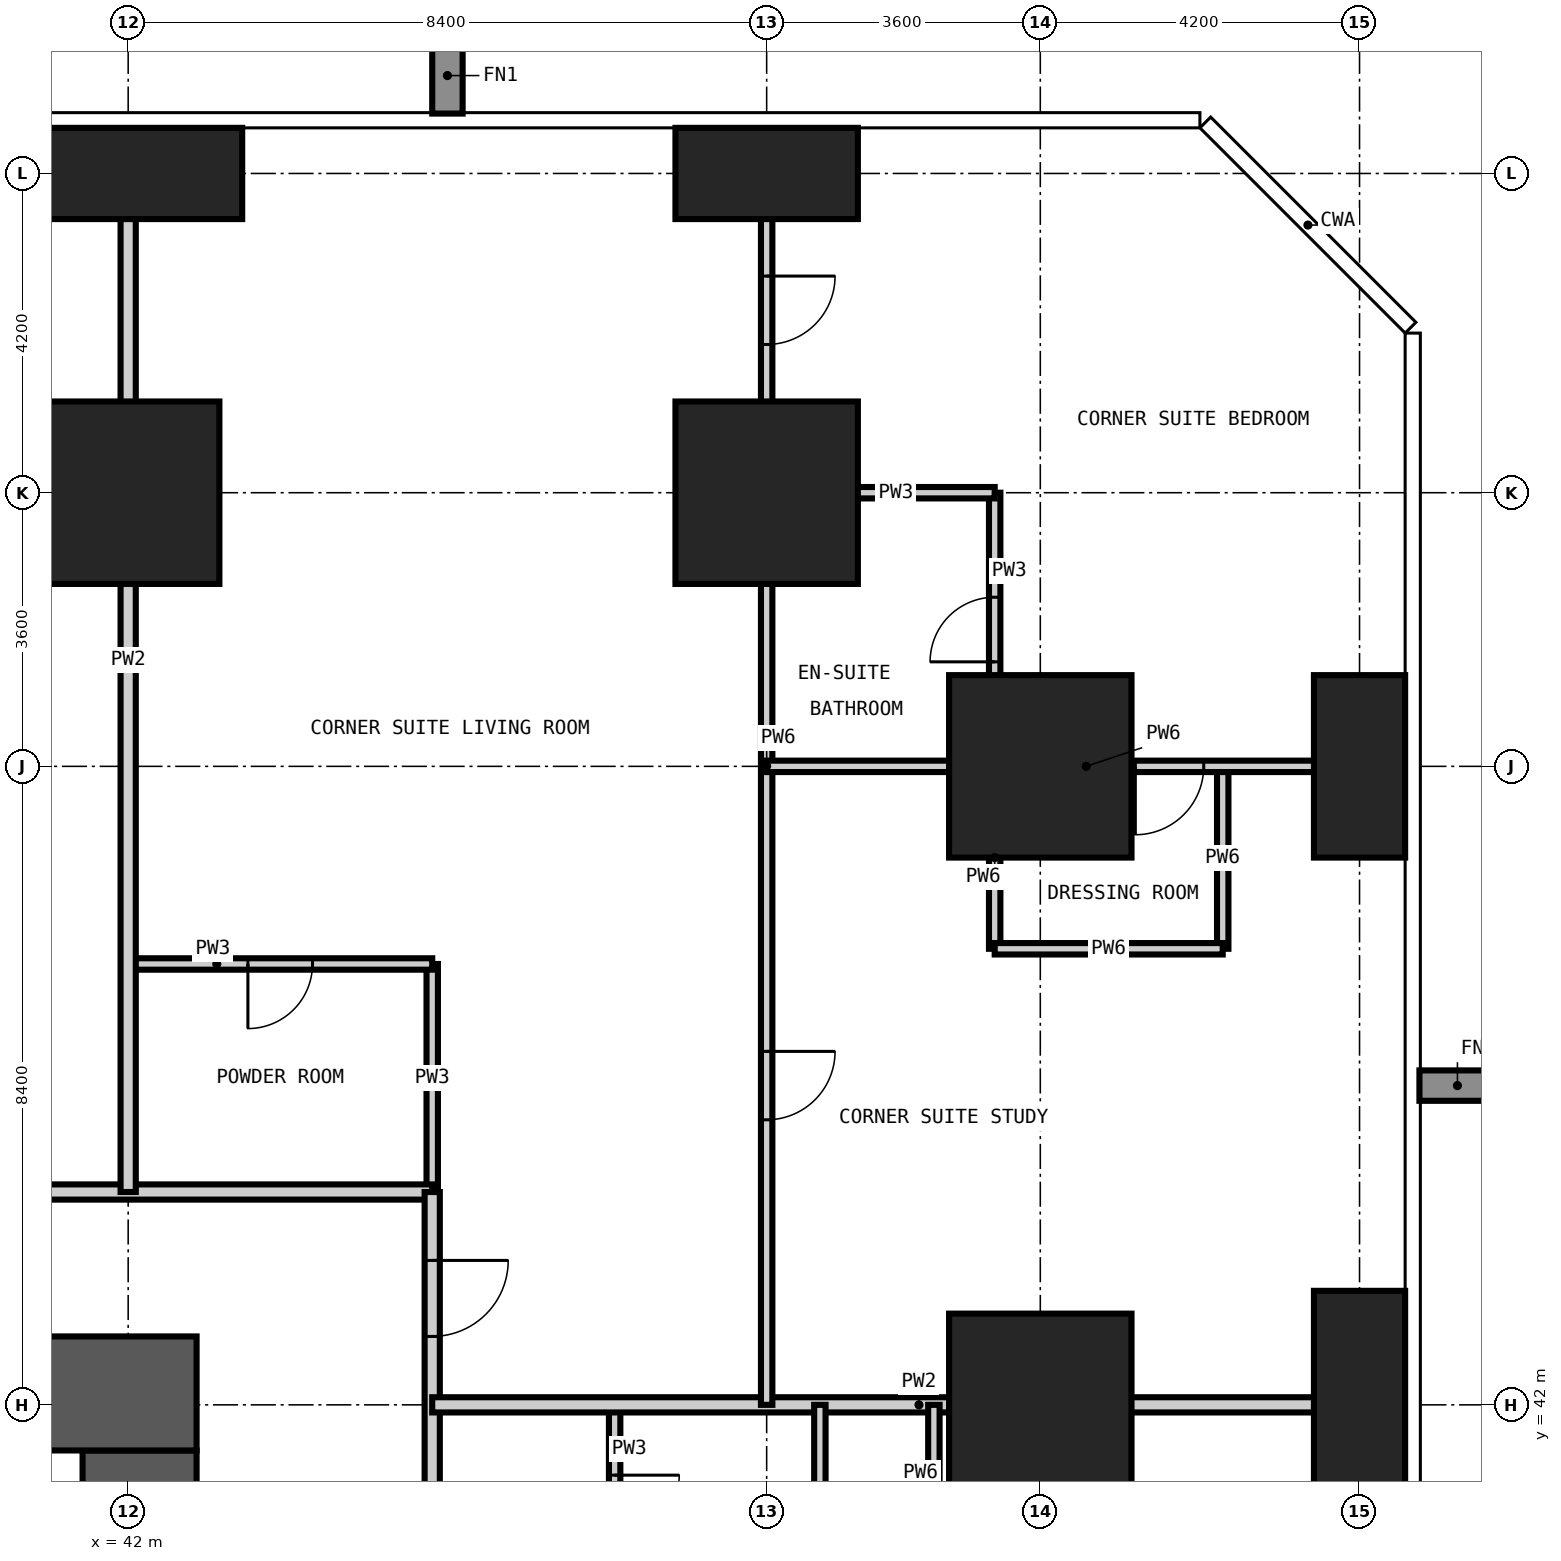
"""IFC4 building model, lengths in metres.
Left out: names, types, materials, properties, quantities, classifications, styles, units other than length and angle.
Written with IfcOpenShell. Run it as: python <this file> out.ifc"""

import sys

from ifc_helpers import new_model, si_unit, direction, frame, frame_2d, origin, origin_2d, place, context, subcontext, project, spatial, rectangle, extrude, element, fill, save


model = new_model("IFC4")
c1 = context("Model", 3, precision=1e-05, world=origin(), true_north=direction((0.0, 1.0)))
c2 = subcontext(c1, "Body", "Model", "MODEL_VIEW")
j1 = project(units=[si_unit("LENGTHUNIT", "METRE"), si_unit("PLANEANGLEUNIT", "RADIAN")], contexts=[c1])
p1 = place(None, origin())
s1 = spatial("IfcSite", under=j1, at=p1, CompositionType="ELEMENT")
p2 = place(p1, origin())
s2 = spatial("IfcBuilding", under=s1, at=p2, CompositionType="ELEMENT")
p3 = place(p2, frame((0.0, 0.0, 84.6)))
s3 = spatial("IfcBuildingStorey", under=s2, at=p3, CompositionType="ELEMENT", Elevation=84.6)
p4 = place(p3, frame((42.0, 54.0, -0.35), z_axis=(0.0, 0.0, 1.0), x_axis=(1.0, 0.0, 0.0)))
e1 = element("IfcColumn", 1, at=p4, inside=s3, PredefinedType="COLUMN", context=c2, shape_type="SweptSolid", body=[
    extrude(rectangle(XDim=2.4, YDim=2.4, at=origin_2d()), origin(), (0.0, 0.0, 1.0), 3.55),
])
p5 = place(p3, frame((42.0, 58.2, -0.35), z_axis=(0.0, 0.0, 1.0), x_axis=(1.0, 0.0, 0.0)))
e2 = element("IfcColumn", 2, at=p5, inside=s3, PredefinedType="COLUMN", context=c2, shape_type="SweptSolid", body=[
    extrude(rectangle(XDim=3.0, YDim=1.2, at=origin_2d()), origin(), (0.0, 0.0, 1.0), 3.55),
])
p6 = place(p3, frame((50.4, 54.0, -0.35), z_axis=(0.0, 0.0, 1.0), x_axis=(1.0, 0.0, 0.0)))
e3 = element("IfcColumn", 3, at=p6, inside=s3, PredefinedType="COLUMN", context=c2, shape_type="SweptSolid", body=[
    extrude(rectangle(XDim=2.4, YDim=2.4, at=origin_2d()), origin(), (0.0, 0.0, 1.0), 3.55),
])
p7 = place(p3, frame((50.4, 58.2, -0.35), z_axis=(0.0, 0.0, 1.0), x_axis=(1.0, 0.0, 0.0)))
e4 = element("IfcColumn", 4, at=p7, inside=s3, PredefinedType="COLUMN", context=c2, shape_type="SweptSolid", body=[
    extrude(rectangle(XDim=2.4, YDim=1.2, at=origin_2d()), origin(), (0.0, 0.0, 1.0), 3.55),
])
for number, where, z_axis, x_axis in (
    (5, (54.0, 42.0, -0.35), (0.0, 0.0, 1.0), (1.0, 0.0, 0.0)),
    (6, (54.0, 50.4, -0.35), (0.0, 0.0, 1.0), (1.0, 0.0, 0.0)),
):
    element("IfcColumn", number, at=place(p3, frame(where, z_axis=z_axis, x_axis=x_axis)), inside=s3, PredefinedType="COLUMN", context=c2, shape_type="SweptSolid", body=[
        extrude(rectangle(XDim=2.4, YDim=2.4, at=origin_2d()), origin(), (0.0, 0.0, 1.0), 3.55),
    ])
p8 = place(p3, frame((58.2, 42.0, -0.35), z_axis=(0.0, 0.0, 1.0), x_axis=(1.0, 0.0, 0.0)))
e7 = element("IfcColumn", 7, at=p8, inside=s3, PredefinedType="COLUMN", context=c2, shape_type="SweptSolid", body=[
    extrude(rectangle(XDim=1.2, YDim=3.0, at=origin_2d()), origin(), (0.0, 0.0, 1.0), 3.55),
])
p9 = place(p3, frame((58.2, 50.4, -0.35), z_axis=(0.0, 0.0, 1.0), x_axis=(1.0, 0.0, 0.0)))
e8 = element("IfcColumn", 8, at=p9, inside=s3, PredefinedType="COLUMN", context=c2, shape_type="SweptSolid", body=[
    extrude(rectangle(XDim=1.2, YDim=2.4, at=origin_2d()), origin(), (0.0, 0.0, 1.0), 3.55),
])
p10 = place(p3, frame((42.15, 17.4, -0.35), z_axis=(0.0, 0.0, 1.0), x_axis=(0.0, 1.0, 0.0)))
e9 = element("IfcWall", 9, at=p10, inside=s3, PredefinedType="SHEAR", context=c2, shape_type="SweptSolid", body=[
    extrude(rectangle(XDim=24.0, YDim=1.5, at=frame_2d((12.0, 0.0))), origin(), (0.0, 0.0, 1.0), 3.55),
])
p11 = place(p10, frame((0.2, 0.0, 0.35)))
e10 = element("IfcOpeningElement", 10, at=p11, cuts=e9, PredefinedType="OPENING", context=c2, shape_type="SweptSolid", body=[
    extrude(rectangle(XDim=1.2, YDim=2.2, at=frame_2d((0.6, 1.1))), frame((0.0, 0.76, 0.0), z_axis=(0.0, -1.0, 0.0), x_axis=(1.0, 0.0, 0.0)), (0.0, 0.0, 1.0), 1.52),
])
p12 = place(p10, frame((11.5, 0.0, 0.35)))
e11 = element("IfcOpeningElement", 11, at=p12, cuts=e9, PredefinedType="OPENING", context=c2, shape_type="SweptSolid", body=[
    extrude(rectangle(XDim=1.0, YDim=2.1, at=frame_2d((0.5, 1.05))), frame((0.0, 0.76, 0.0), z_axis=(0.0, -1.0, 0.0), x_axis=(1.0, 0.0, 0.0)), (0.0, 0.0, 1.0), 1.52),
])
p13 = place(p10, frame((19.9, 0.0, 0.35)))
e12 = element("IfcOpeningElement", 12, at=p13, cuts=e9, PredefinedType="OPENING", context=c2, shape_type="SweptSolid", body=[
    extrude(rectangle(XDim=1.0, YDim=2.1, at=frame_2d((0.5, 1.05))), frame((0.0, 0.76, 0.0), z_axis=(0.0, -1.0, 0.0), x_axis=(1.0, 0.0, 0.0)), (0.0, 0.0, 1.0), 1.52),
])
p14 = place(p3, frame((42.9, 42.15, -0.35), z_axis=(0.0, 0.0, 1.0), x_axis=(-1.0, 0.0, 0.0)))
e13 = element("IfcWall", 13, at=p14, inside=s3, PredefinedType="SHEAR", context=c2, shape_type="SweptSolid", body=[
    extrude(rectangle(XDim=27.0, YDim=1.5, at=frame_2d((13.5, 0.0))), origin(), (0.0, 0.0, 1.0), 3.55),
])
p15 = place(p14, frame((21.4, 0.0, 0.35)))
e14 = element("IfcOpeningElement", 14, at=p15, cuts=e13, PredefinedType="OPENING", context=c2, shape_type="SweptSolid", body=[
    extrude(rectangle(XDim=1.0, YDim=2.1, at=frame_2d((0.5, 1.05))), frame((0.0, 0.76, 0.0), z_axis=(0.0, -1.0, 0.0), x_axis=(1.0, 0.0, 0.0)), (0.0, 0.0, 1.0), 1.52),
])
p16 = place(p14, frame((10.8, 0.0, 0.35)))
e15 = element("IfcOpeningElement", 15, at=p16, cuts=e13, PredefinedType="OPENING", context=c2, shape_type="SweptSolid", body=[
    extrude(rectangle(XDim=1.2, YDim=2.2, at=frame_2d((0.6, 1.1))), frame((0.0, 0.76, 0.0), z_axis=(0.0, -1.0, 0.0), x_axis=(1.0, 0.0, 0.0)), (0.0, 0.0, 1.0), 1.52),
])
p17 = place(p3, frame((46.0, 44.8, 0.0), z_axis=(0.0, 0.0, 1.0), x_axis=(0.0, 1.0, 0.0)))
e16 = element("IfcWall", 16, at=p17, inside=s3, PredefinedType="PARTITIONING", context=c2, shape_type="SweptSolid", body=[
    extrude(rectangle(XDim=3.0, YDim=0.15, at=frame_2d((1.5, 0.0))), origin(), (0.0, 0.0, 1.0), 3.2),
])
p18 = place(p3, frame((48.4, 39.3, 0.0), z_axis=(0.0, 0.0, 1.0), x_axis=(0.0, 1.0, 0.0)))
e17 = element("IfcWall", 17, at=p18, inside=s3, PredefinedType="PARTITIONING", context=c2, shape_type="SweptSolid", body=[
    extrude(rectangle(XDim=2.7, YDim=0.15, at=frame_2d((1.35, 0.0))), origin(), (0.0, 0.0, 1.0), 3.2),
])
p19 = place(p18, frame((0.925, 0.0, 0.0)))
e18 = element("IfcOpeningElement", 18, at=p19, cuts=e17, PredefinedType="OPENING", context=c2, shape_type="SweptSolid", body=[
    extrude(rectangle(XDim=0.85, YDim=2.1, at=frame_2d((0.425, 1.05))), frame((0.0, 0.085, 0.0), z_axis=(0.0, -1.0, 0.0), x_axis=(1.0, 0.0, 0.0)), (0.0, 0.0, 1.0), 0.17),
])
p20 = place(p3, frame((53.4, 50.4, 0.0), z_axis=(0.0, 0.0, 1.0), x_axis=(0.0, 1.0, 0.0)))
e19 = element("IfcWall", 19, at=p20, inside=s3, PredefinedType="PARTITIONING", context=c2, shape_type="SweptSolid", body=[
    extrude(rectangle(XDim=3.6, YDim=0.15, at=frame_2d((1.8, 0.0))), origin(), (0.0, 0.0, 1.0), 3.2),
])
p21 = place(p20, frame((1.375, 0.0, 0.0)))
e20 = element("IfcOpeningElement", 20, at=p21, cuts=e19, PredefinedType="OPENING", context=c2, shape_type="SweptSolid", body=[
    extrude(rectangle(XDim=0.85, YDim=2.1, at=frame_2d((0.425, 1.05))), frame((0.0, 0.085, 0.0), z_axis=(0.0, -1.0, 0.0), x_axis=(1.0, 0.0, 0.0)), (0.0, 0.0, 1.0), 0.17),
])
p22 = place(p3, frame((42.0, 47.8, 0.0), z_axis=(0.0, 0.0, 1.0), x_axis=(1.0, 0.0, 0.0)))
e21 = element("IfcWall", 21, at=p22, inside=s3, PredefinedType="PARTITIONING", context=c2, shape_type="SweptSolid", body=[
    extrude(rectangle(XDim=4.0, YDim=0.15, at=frame_2d((2.0, 0.0))), origin(), (0.0, 0.0, 1.0), 3.2),
])
p23 = place(p22, frame((1.575, 0.0, 0.0)))
e22 = element("IfcOpeningElement", 22, at=p23, cuts=e21, PredefinedType="OPENING", context=c2, shape_type="SweptSolid", body=[
    extrude(rectangle(XDim=0.85, YDim=2.1, at=frame_2d((0.425, 1.05))), frame((0.0, 0.085, 0.0), z_axis=(0.0, -1.0, 0.0), x_axis=(1.0, 0.0, 0.0)), (0.0, 0.0, 1.0), 0.17),
])
p24 = place(p3, frame((50.4, 54.0, 0.0), z_axis=(0.0, 0.0, 1.0), x_axis=(1.0, 0.0, 0.0)))
e23 = element("IfcWall", 23, at=p24, inside=s3, PredefinedType="PARTITIONING", context=c2, shape_type="SweptSolid", body=[
    extrude(rectangle(XDim=3.0, YDim=0.15, at=frame_2d((1.5, 0.0))), origin(), (0.0, 0.0, 1.0), 3.2),
])
p25 = place(p3, frame((13.4, 44.8, 0.0), z_axis=(0.0, 0.0, 1.0), x_axis=(1.0, 0.0, 0.0)))
e24 = element("IfcWall", 24, at=p25, inside=s3, PredefinedType="PARTITIONING", context=c2, shape_type="SweptSolid", body=[
    extrude(rectangle(XDim=32.6, YDim=0.2, at=frame_2d((16.3, 0.0))), origin(), (0.0, 0.0, 1.0), 3.2),
])
p26 = place(p25, frame((7.1, 0.0, 0.0)))
e25 = element("IfcOpeningElement", 25, at=p26, cuts=e24, PredefinedType="OPENING", context=c2, shape_type="SweptSolid", body=[
    extrude(rectangle(XDim=1.0, YDim=2.2, at=frame_2d((0.5, 1.1))), frame((0.0, 0.11, 0.0), z_axis=(0.0, -1.0, 0.0), x_axis=(1.0, 0.0, 0.0)), (0.0, 0.0, 1.0), 0.22),
])
p27 = place(p25, frame((15.5, 0.0, 0.0)))
e26 = element("IfcOpeningElement", 26, at=p27, cuts=e24, PredefinedType="OPENING", context=c2, shape_type="SweptSolid", body=[
    extrude(rectangle(XDim=1.0, YDim=2.2, at=frame_2d((0.5, 1.1))), frame((0.0, 0.11, 0.0), z_axis=(0.0, -1.0, 0.0), x_axis=(1.0, 0.0, 0.0)), (0.0, 0.0, 1.0), 0.22),
])
p28 = place(p25, frame((23.9, 0.0, 0.0)))
e27 = element("IfcOpeningElement", 27, at=p28, cuts=e24, PredefinedType="OPENING", context=c2, shape_type="SweptSolid", body=[
    extrude(rectangle(XDim=1.0, YDim=2.2, at=frame_2d((0.5, 1.1))), frame((0.0, 0.11, 0.0), z_axis=(0.0, -1.0, 0.0), x_axis=(1.0, 0.0, 0.0)), (0.0, 0.0, 1.0), 0.22),
])
p29 = place(p3, frame((46.0, 44.8, 0.0), z_axis=(0.0, 0.0, 1.0), x_axis=(0.0, -1.0, 0.0)))
e28 = element("IfcWall", 28, at=p29, inside=s3, PredefinedType="PARTITIONING", context=c2, shape_type="SweptSolid", body=[
    extrude(rectangle(XDim=31.4, YDim=0.2, at=frame_2d((15.7, 0.0))), origin(), (0.0, 0.0, 1.0), 3.2),
])
p30 = place(p29, frame((21.2, 0.0, 0.0)))
e29 = element("IfcOpeningElement", 29, at=p30, cuts=e28, PredefinedType="OPENING", context=c2, shape_type="SweptSolid", body=[
    extrude(rectangle(XDim=1.0, YDim=2.2, at=frame_2d((0.5, 1.1))), frame((0.0, 0.11, 0.0), z_axis=(0.0, -1.0, 0.0), x_axis=(1.0, 0.0, 0.0)), (0.0, 0.0, 1.0), 0.22),
])
p31 = place(p29, frame((8.6, 0.0, 0.0)))
e30 = element("IfcOpeningElement", 30, at=p31, cuts=e28, PredefinedType="OPENING", context=c2, shape_type="SweptSolid", body=[
    extrude(rectangle(XDim=1.0, YDim=2.2, at=frame_2d((0.5, 1.1))), frame((0.0, 0.11, 0.0), z_axis=(0.0, -1.0, 0.0), x_axis=(1.0, 0.0, 0.0)), (0.0, 0.0, 1.0), 0.22),
])
p32 = place(p29, frame((29.2, 0.0, 0.0)))
e31 = element("IfcOpeningElement", 31, at=p32, cuts=e28, PredefinedType="OPENING", context=c2, shape_type="SweptSolid", body=[
    extrude(rectangle(XDim=1.0, YDim=2.2, at=frame_2d((0.5, 1.1))), frame((0.0, 0.11, 0.0), z_axis=(0.0, -1.0, 0.0), x_axis=(1.0, 0.0, 0.0)), (0.0, 0.0, 1.0), 0.22),
])
p33 = place(p29, frame((0.9, 0.0, 0.0)))
e32 = element("IfcOpeningElement", 32, at=p33, cuts=e28, PredefinedType="OPENING", context=c2, shape_type="SweptSolid", body=[
    extrude(rectangle(XDim=1.0, YDim=2.2, at=frame_2d((0.5, 1.1))), frame((0.0, 0.11, 0.0), z_axis=(0.0, -1.0, 0.0), x_axis=(1.0, 0.0, 0.0)), (0.0, 0.0, 1.0), 0.22),
])
p34 = place(p3, frame((42.0, 44.8, 0.0), z_axis=(0.0, 0.0, 1.0), x_axis=(0.0, 1.0, 0.0)))
e33 = element("IfcWall", 33, at=p34, inside=s3, PredefinedType="PARTITIONING", context=c2, shape_type="SweptSolid", body=[
    extrude(rectangle(XDim=14.008, YDim=0.2, at=frame_2d((7.004, 0.0))), origin(), (0.0, 0.0, 1.0), 3.2),
])
p35 = place(p3, frame((46.0, 42.0, 0.0), z_axis=(0.0, 0.0, 1.0), x_axis=(1.0, 0.0, 0.0)))
e34 = element("IfcWall", 34, at=p35, inside=s3, PredefinedType="PARTITIONING", context=c2, shape_type="SweptSolid", body=[
    extrude(rectangle(XDim=12.808, YDim=0.2, at=frame_2d((6.404, 0.0))), origin(), (0.0, 0.0, 1.0), 3.2),
])
p36 = place(p3, frame((50.4, 42.0, 0.0), z_axis=(0.0, 0.0, 1.0), x_axis=(0.0, 1.0, 0.0)))
e35 = element("IfcWall", 35, at=p36, inside=s3, PredefinedType="PARTITIONING", context=c2, shape_type="SweptSolid", body=[
    extrude(rectangle(XDim=16.808, YDim=0.15, at=frame_2d((8.404, 0.0))), origin(), (0.0, 0.0, 1.0), 3.2),
])
p37 = place(p36, frame((13.95, 0.0, 0.0)))
e36 = element("IfcOpeningElement", 36, at=p37, cuts=e35, PredefinedType="OPENING", context=c2, shape_type="SweptSolid", body=[
    extrude(rectangle(XDim=0.9, YDim=2.1, at=frame_2d((0.45, 1.05))), frame((0.0, 0.085, 0.0), z_axis=(0.0, -1.0, 0.0), x_axis=(1.0, 0.0, 0.0)), (0.0, 0.0, 1.0), 0.17),
])
p38 = place(p36, frame((3.75, 0.0, 0.0)))
e37 = element("IfcOpeningElement", 37, at=p38, cuts=e35, PredefinedType="OPENING", context=c2, shape_type="SweptSolid", body=[
    extrude(rectangle(XDim=0.9, YDim=2.1, at=frame_2d((0.45, 1.05))), frame((0.0, 0.085, 0.0), z_axis=(0.0, -1.0, 0.0), x_axis=(1.0, 0.0, 0.0)), (0.0, 0.0, 1.0), 0.17),
])
p39 = place(p3, frame((51.1, 39.3, 0.0), z_axis=(0.0, 0.0, 1.0), x_axis=(0.0, 1.0, 0.0)))
e38 = element("IfcWall", 38, at=p39, inside=s3, PredefinedType="PARTITIONING", context=c2, shape_type="SweptSolid", body=[
    extrude(rectangle(XDim=2.7, YDim=0.15, at=frame_2d((1.35, 0.0))), origin(), (0.0, 0.0, 1.0), 3.2),
])
p40 = place(p3, frame((52.6, 39.3, 0.0), z_axis=(0.0, 0.0, 1.0), x_axis=(0.0, 1.0, 0.0)))
e39 = element("IfcWall", 39, at=p40, inside=s3, PredefinedType="PARTITIONING", context=c2, shape_type="SweptSolid", body=[
    extrude(rectangle(XDim=2.7, YDim=0.15, at=frame_2d((1.35, 0.0))), origin(), (0.0, 0.0, 1.0), 3.2),
])
p41 = place(p40, frame((0.5, 0.0, 0.0)))
e40 = element("IfcOpeningElement", 40, at=p41, cuts=e39, PredefinedType="OPENING", context=c2, shape_type="SweptSolid", body=[
    extrude(rectangle(XDim=0.9, YDim=2.1, at=frame_2d((0.45, 1.05))), frame((0.0, 0.085, 0.0), z_axis=(0.0, -1.0, 0.0), x_axis=(1.0, 0.0, 0.0)), (0.0, 0.0, 1.0), 0.17),
])
for number, where, z_axis, x_axis in (
    (41, (53.4, 48.0, 0.0), (0.0, 0.0, 1.0), (0.0, 1.0, 0.0)),
    (42, (56.4, 48.0, 0.0), (0.0, 0.0, 1.0), (0.0, 1.0, 0.0)),
):
    element("IfcWall", number, at=place(p3, frame(where, z_axis=z_axis, x_axis=x_axis)), inside=s3, PredefinedType="PARTITIONING", context=c2, shape_type="SweptSolid", body=[
        extrude(rectangle(XDim=2.4, YDim=0.15, at=frame_2d((1.2, 0.0))), origin(), (0.0, 0.0, 1.0), 3.2),
    ])
p42 = place(p3, frame((53.4, 48.0, 0.0), z_axis=(0.0, 0.0, 1.0), x_axis=(1.0, 0.0, 0.0)))
e43 = element("IfcWall", 43, at=p42, inside=s3, PredefinedType="PARTITIONING", context=c2, shape_type="SweptSolid", body=[
    extrude(rectangle(XDim=3.0, YDim=0.15, at=frame_2d((1.5, 0.0))), origin(), (0.0, 0.0, 1.0), 3.2),
])
p43 = place(p3, frame((50.4, 50.4, 0.0), z_axis=(0.0, 0.0, 1.0), x_axis=(1.0, 0.0, 0.0)))
e44 = element("IfcWall", 44, at=p43, inside=s3, PredefinedType="PARTITIONING", context=c2, shape_type="SweptSolid", body=[
    extrude(rectangle(XDim=8.408, YDim=0.15, at=frame_2d((4.204, 0.0))), origin(), (0.0, 0.0, 1.0), 3.2),
])
p44 = place(p43, frame((4.85, 0.0, 0.0)))
e45 = element("IfcOpeningElement", 45, at=p44, cuts=e44, PredefinedType="OPENING", context=c2, shape_type="SweptSolid", body=[
    extrude(rectangle(XDim=0.9, YDim=2.1, at=frame_2d((0.45, 1.05))), frame((0.0, 0.085, 0.0), z_axis=(0.0, -1.0, 0.0), x_axis=(1.0, 0.0, 0.0)), (0.0, 0.0, 1.0), 0.17),
])
p45 = place(p19, frame((0.85, 0.0, 0.0), z_axis=(0.0, 0.0, 1.0), x_axis=(-1.0, 0.0, 0.0)))
e46 = element("IfcDoor", 46, at=p45, inside=s3, OperationType="SINGLE_SWING_LEFT", PredefinedType="DOOR", context=c2, shape_type="SweptSolid", body=[
    extrude(rectangle(XDim=0.85, YDim=2.1, at=frame_2d((0.425, 1.05))), frame((0.0, 0.025, 0.0), z_axis=(0.0, -1.0, 0.0), x_axis=(1.0, 0.0, 0.0)), (0.0, 0.0, 1.0), 0.05),
])
fill(e18, e46)
p46 = place(p33, origin())
e47 = element("IfcDoor", 47, at=p46, inside=s3, OperationType="SINGLE_SWING_LEFT", PredefinedType="DOOR", context=c2, shape_type="SweptSolid", body=[
    extrude(rectangle(XDim=1.0, YDim=2.2, at=frame_2d((0.5, 1.1))), frame((0.0, 0.025, 0.0), z_axis=(0.0, -1.0, 0.0), x_axis=(1.0, 0.0, 0.0)), (0.0, 0.0, 1.0), 0.05),
])
fill(e32, e47)
p47 = place(p23, frame((0.85, 0.0, 0.0), z_axis=(0.0, 0.0, 1.0), x_axis=(-1.0, 0.0, 0.0)))
e48 = element("IfcDoor", 48, at=p47, inside=s3, OperationType="SINGLE_SWING_RIGHT", PredefinedType="DOOR", context=c2, shape_type="SweptSolid", body=[
    extrude(rectangle(XDim=0.85, YDim=2.1, at=frame_2d((0.425, 1.05))), frame((0.0, 0.025, 0.0), z_axis=(0.0, -1.0, 0.0), x_axis=(1.0, 0.0, 0.0)), (0.0, 0.0, 1.0), 0.05),
])
fill(e22, e48)
p48 = place(p37, frame((0.9, 0.0, 0.0), z_axis=(0.0, 0.0, 1.0), x_axis=(-1.0, 0.0, 0.0)))
e49 = element("IfcDoor", 49, at=p48, inside=s3, OperationType="SINGLE_SWING_LEFT", PredefinedType="DOOR", context=c2, shape_type="SweptSolid", body=[
    extrude(rectangle(XDim=0.9, YDim=2.1, at=frame_2d((0.45, 1.05))), frame((0.0, 0.025, 0.0), z_axis=(0.0, -1.0, 0.0), x_axis=(1.0, 0.0, 0.0)), (0.0, 0.0, 1.0), 0.05),
])
fill(e36, e49)
p49 = place(p21, origin())
e50 = element("IfcDoor", 50, at=p49, inside=s3, OperationType="SINGLE_SWING_LEFT", PredefinedType="DOOR", context=c2, shape_type="SweptSolid", body=[
    extrude(rectangle(XDim=0.85, YDim=2.1, at=frame_2d((0.425, 1.05))), frame((0.0, 0.025, 0.0), z_axis=(0.0, -1.0, 0.0), x_axis=(1.0, 0.0, 0.0)), (0.0, 0.0, 1.0), 0.05),
])
fill(e20, e50)
p50 = place(p44, frame((0.9, 0.0, 0.0), z_axis=(0.0, 0.0, 1.0), x_axis=(-1.0, 0.0, 0.0)))
e51 = element("IfcDoor", 51, at=p50, inside=s3, OperationType="SINGLE_SWING_RIGHT", PredefinedType="DOOR", context=c2, shape_type="SweptSolid", body=[
    extrude(rectangle(XDim=0.9, YDim=2.1, at=frame_2d((0.45, 1.05))), frame((0.0, 0.025, 0.0), z_axis=(0.0, -1.0, 0.0), x_axis=(1.0, 0.0, 0.0)), (0.0, 0.0, 1.0), 0.05),
])
fill(e45, e51)
p51 = place(p38, frame((0.9, 0.0, 0.0), z_axis=(0.0, 0.0, 1.0), x_axis=(-1.0, 0.0, 0.0)))
e52 = element("IfcDoor", 52, at=p51, inside=s3, OperationType="SINGLE_SWING_LEFT", PredefinedType="DOOR", context=c2, shape_type="SweptSolid", body=[
    extrude(rectangle(XDim=0.9, YDim=2.1, at=frame_2d((0.45, 1.05))), frame((0.0, 0.025, 0.0), z_axis=(0.0, -1.0, 0.0), x_axis=(1.0, 0.0, 0.0)), (0.0, 0.0, 1.0), 0.05),
])
fill(e37, e52)
save(model, sys.argv[1])
